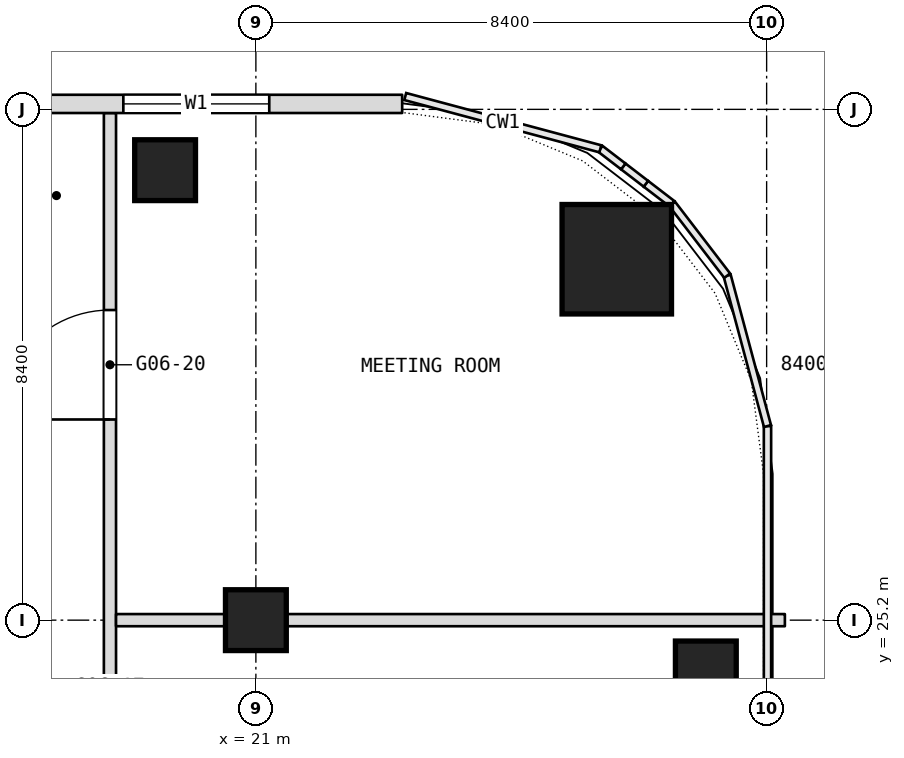
"""IFC4 building model, lengths in metres.
Left out: names, types, materials, properties, quantities, classifications, styles, units other than length and angle.
Written with IfcOpenShell. Run it as: python <this file> out.ifc"""

import sys

from ifc_helpers import new_model, si_unit, direction, frame, frame_2d, origin, origin_2d, place, context, subcontext, project, spatial, rectangle, extrude, element, fill, save


model = new_model("IFC4")
c1 = context("Model", 3, precision=1e-05, world=origin(), true_north=direction((0.0, 1.0)))
c2 = subcontext(c1, "Body", "Model", "MODEL_VIEW")
j1 = project(units=[si_unit("LENGTHUNIT", "METRE"), si_unit("PLANEANGLEUNIT", "RADIAN")], contexts=[c1])
p1 = place(None, origin())
s1 = spatial("IfcSite", under=j1, at=p1, CompositionType="ELEMENT")
p2 = place(p1, origin())
s2 = spatial("IfcBuilding", under=s1, at=p2, CompositionType="ELEMENT")
p3 = place(p2, frame((0.0, 0.0, 76.1)))
s3 = spatial("IfcBuildingStorey", under=s2, at=p3, CompositionType="ELEMENT", Elevation=76.1)
p4 = place(p3, frame((26.936, 31.135, 0.0), z_axis=(0.0, 0.0, 1.0), x_axis=(1.0, 0.0, 0.0)))
e1 = element("IfcColumn", 1, at=p4, inside=s3, PredefinedType="COLUMN", context=c2, shape_type="SweptSolid", body=[
    extrude(rectangle(XDim=1.8, YDim=1.8, at=origin_2d()), origin(), (0.0, 0.0, 1.0), 3.6),
])
for number, where, z_axis, x_axis in (
    (2, (21.0, 25.2, 0.0), (0.0, 0.0, 1.0), (1.0, 0.0, 0.0)),
    (3, (19.507, 32.6, 0.0), (0.0, 0.0, 1.0), (1.0, 0.0, 0.0)),
    (4, (28.4, 24.356, 0.0), (0.0, 0.0, 1.0), (1.0, 0.0, 0.0)),
):
    element("IfcColumn", number, at=place(p3, frame(where, z_axis=z_axis, x_axis=x_axis)), inside=s3, PredefinedType="COLUMN", context=c2, shape_type="SweptSolid", body=[
        extrude(rectangle(XDim=1.0, YDim=1.0, at=origin_2d()), origin(), (0.0, 0.0, 1.0), 3.6),
    ])
p5 = place(p3, frame((18.6, -16.665, 0.0), z_axis=(0.0, 0.0, 1.0), x_axis=(0.0, 1.0, 0.0)))
e5 = element("IfcWall", 5, at=p5, inside=s3, PredefinedType="PARTITIONING", context=c2, shape_type="SweptSolid", body=[
    extrude(rectangle(XDim=50.205, YDim=0.2, at=frame_2d((25.103, 0.0))), origin(), (0.0, 0.0, 1.0), 3.34),
])
p6 = place(p5, frame((4.0, 0.0, 0.0)))
e6 = element("IfcOpeningElement", 6, at=p6, cuts=e5, PredefinedType="OPENING", context=c2, shape_type="SweptSolid", body=[
    extrude(rectangle(XDim=1.1, YDim=2.1, at=frame_2d((0.55, 1.05))), frame((0.0, 0.1, 0.0), z_axis=(0.0, -1.0, 0.0), x_axis=(1.0, 0.0, 0.0)), (0.0, 0.0, 1.0), 0.2),
])
p7 = place(p5, frame((8.665, 0.0, 0.0)))
e7 = element("IfcOpeningElement", 7, at=p7, cuts=e5, PredefinedType="OPENING", context=c2, shape_type="SweptSolid", body=[
    extrude(rectangle(XDim=1.0, YDim=2.1, at=frame_2d((0.5, 1.05))), frame((0.0, 0.1, 0.0), z_axis=(0.0, -1.0, 0.0), x_axis=(1.0, 0.0, 0.0)), (0.0, 0.0, 1.0), 0.2),
])
p8 = place(p5, frame((15.265, 0.0, 0.0)))
e8 = element("IfcOpeningElement", 8, at=p8, cuts=e5, PredefinedType="OPENING", context=c2, shape_type="SweptSolid", body=[
    extrude(rectangle(XDim=1.0, YDim=2.1, at=frame_2d((0.5, 1.05))), frame((0.0, 0.1, 0.0), z_axis=(0.0, -1.0, 0.0), x_axis=(1.0, 0.0, 0.0)), (0.0, 0.0, 1.0), 0.2),
])
p9 = place(p5, frame((19.965, 0.0, 0.0)))
e9 = element("IfcOpeningElement", 9, at=p9, cuts=e5, PredefinedType="OPENING", context=c2, shape_type="SweptSolid", body=[
    extrude(rectangle(XDim=1.8, YDim=2.1, at=frame_2d((0.9, 1.05))), frame((0.0, 0.1, 0.0), z_axis=(0.0, -1.0, 0.0), x_axis=(1.0, 0.0, 0.0)), (0.0, 0.0, 1.0), 0.2),
])
p10 = place(p5, frame((28.665, 0.0, 0.0)))
e10 = element("IfcOpeningElement", 10, at=p10, cuts=e5, PredefinedType="OPENING", context=c2, shape_type="SweptSolid", body=[
    extrude(rectangle(XDim=1.1, YDim=2.1, at=frame_2d((0.55, 1.05))), frame((0.0, 0.1, 0.0), z_axis=(0.0, -1.0, 0.0), x_axis=(1.0, 0.0, 0.0)), (0.0, 0.0, 1.0), 0.2),
])
p11 = place(p5, frame((39.215, 0.0, 0.0)))
e11 = element("IfcOpeningElement", 11, at=p11, cuts=e5, PredefinedType="OPENING", context=c2, shape_type="SweptSolid", body=[
    extrude(rectangle(XDim=1.1, YDim=2.1, at=frame_2d((0.55, 1.05))), frame((0.0, 0.1, 0.0), z_axis=(0.0, -1.0, 0.0), x_axis=(1.0, 0.0, 0.0)), (0.0, 0.0, 1.0), 0.2),
])
p12 = place(p5, frame((45.165, 0.0, 0.0)))
e12 = element("IfcOpeningElement", 12, at=p12, cuts=e5, PredefinedType="OPENING", context=c2, shape_type="SweptSolid", body=[
    extrude(rectangle(XDim=1.8, YDim=2.1, at=frame_2d((0.9, 1.05))), frame((0.0, 0.1, 0.0), z_axis=(0.0, -1.0, 0.0), x_axis=(1.0, 0.0, 0.0)), (0.0, 0.0, 1.0), 0.2),
])
p13 = place(p3, frame((18.7, 25.2, 0.0), z_axis=(0.0, 0.0, 1.0), x_axis=(1.0, 0.0, 0.0)))
e13 = element("IfcWall", 13, at=p13, inside=s3, PredefinedType="PARTITIONING", context=c2, shape_type="SweptSolid", body=[
    extrude(rectangle(XDim=11.0, YDim=0.2, at=frame_2d((5.5, 0.0))), origin(), (0.0, 0.0, 1.0), 2.84),
])
p14 = place(p3, frame((23.406, 33.69, 0.0), z_axis=(0.0, 0.0, 1.0), x_axis=(-1.0, 0.0, 0.0)))
e14 = element("IfcWall", 14, at=p14, inside=s3, PredefinedType="NOTDEFINED", context=c2, shape_type="SweptSolid", body=[
    extrude(rectangle(XDim=46.812, YDim=0.3, at=frame_2d((23.406, 0.0))), origin(), (0.0, 0.0, 1.0), 3.6),
])
p15 = place(p14, frame((2.186, 0.0, 0.9)))
e15 = element("IfcOpeningElement", 15, at=p15, cuts=e14, PredefinedType="OPENING", context=c2, shape_type="SweptSolid", body=[
    extrude(rectangle(XDim=2.4, YDim=2.1, at=frame_2d((1.2, 1.05))), frame((0.0, 0.15, 0.0), z_axis=(0.0, -1.0, 0.0), x_axis=(1.0, 0.0, 0.0)), (0.0, 0.0, 1.0), 0.3),
])
p16 = place(p14, frame((7.506, 0.0, 0.9)))
e16 = element("IfcOpeningElement", 16, at=p16, cuts=e14, PredefinedType="OPENING", context=c2, shape_type="SweptSolid", body=[
    extrude(rectangle(XDim=2.4, YDim=2.1, at=frame_2d((1.2, 1.05))), frame((0.0, 0.15, 0.0), z_axis=(0.0, -1.0, 0.0), x_axis=(1.0, 0.0, 0.0)), (0.0, 0.0, 1.0), 0.3),
])
p17 = place(p14, frame((11.706, 0.0, 0.9)))
e17 = element("IfcOpeningElement", 17, at=p17, cuts=e14, PredefinedType="OPENING", context=c2, shape_type="SweptSolid", body=[
    extrude(rectangle(XDim=2.4, YDim=2.1, at=frame_2d((1.2, 1.05))), frame((0.0, 0.15, 0.0), z_axis=(0.0, -1.0, 0.0), x_axis=(1.0, 0.0, 0.0)), (0.0, 0.0, 1.0), 0.3),
])
p18 = place(p14, frame((15.906, 0.0, 0.9)))
e18 = element("IfcOpeningElement", 18, at=p18, cuts=e14, PredefinedType="OPENING", context=c2, shape_type="SweptSolid", body=[
    extrude(rectangle(XDim=2.4, YDim=2.1, at=frame_2d((1.2, 1.05))), frame((0.0, 0.15, 0.0), z_axis=(0.0, -1.0, 0.0), x_axis=(1.0, 0.0, 0.0)), (0.0, 0.0, 1.0), 0.3),
])
p19 = place(p14, frame((20.106, 0.0, 0.9)))
e19 = element("IfcOpeningElement", 19, at=p19, cuts=e14, PredefinedType="OPENING", context=c2, shape_type="SweptSolid", body=[
    extrude(rectangle(XDim=2.4, YDim=2.1, at=frame_2d((1.2, 1.05))), frame((0.0, 0.15, 0.0), z_axis=(0.0, -1.0, 0.0), x_axis=(1.0, 0.0, 0.0)), (0.0, 0.0, 1.0), 0.3),
])
p20 = place(p14, frame((24.306, 0.0, 0.9)))
e20 = element("IfcOpeningElement", 20, at=p20, cuts=e14, PredefinedType="OPENING", context=c2, shape_type="SweptSolid", body=[
    extrude(rectangle(XDim=2.4, YDim=2.1, at=frame_2d((1.2, 1.05))), frame((0.0, 0.15, 0.0), z_axis=(0.0, -1.0, 0.0), x_axis=(1.0, 0.0, 0.0)), (0.0, 0.0, 1.0), 0.3),
])
p21 = place(p14, frame((28.506, 0.0, 0.9)))
e21 = element("IfcOpeningElement", 21, at=p21, cuts=e14, PredefinedType="OPENING", context=c2, shape_type="SweptSolid", body=[
    extrude(rectangle(XDim=2.4, YDim=2.1, at=frame_2d((1.2, 1.05))), frame((0.0, 0.15, 0.0), z_axis=(0.0, -1.0, 0.0), x_axis=(1.0, 0.0, 0.0)), (0.0, 0.0, 1.0), 0.3),
])
p22 = place(p14, frame((32.706, 0.0, 0.9)))
e22 = element("IfcOpeningElement", 22, at=p22, cuts=e14, PredefinedType="OPENING", context=c2, shape_type="SweptSolid", body=[
    extrude(rectangle(XDim=2.4, YDim=2.1, at=frame_2d((1.2, 1.05))), frame((0.0, 0.15, 0.0), z_axis=(0.0, -1.0, 0.0), x_axis=(1.0, 0.0, 0.0)), (0.0, 0.0, 1.0), 0.3),
])
p23 = place(p14, frame((36.906, 0.0, 0.9)))
e23 = element("IfcOpeningElement", 23, at=p23, cuts=e14, PredefinedType="OPENING", context=c2, shape_type="SweptSolid", body=[
    extrude(rectangle(XDim=2.4, YDim=2.1, at=frame_2d((1.2, 1.05))), frame((0.0, 0.15, 0.0), z_axis=(0.0, -1.0, 0.0), x_axis=(1.0, 0.0, 0.0)), (0.0, 0.0, 1.0), 0.3),
])
p24 = place(p14, frame((42.226, 0.0, 0.9)))
e24 = element("IfcOpeningElement", 24, at=p24, cuts=e14, PredefinedType="OPENING", context=c2, shape_type="SweptSolid", body=[
    extrude(rectangle(XDim=2.4, YDim=2.1, at=frame_2d((1.2, 1.05))), frame((0.0, 0.15, 0.0), z_axis=(0.0, -1.0, 0.0), x_axis=(1.0, 0.0, 0.0)), (0.0, 0.0, 1.0), 0.3),
])
p25 = place(p12, origin())
e25 = element("IfcDoor", 25, at=p25, inside=s3, OperationType="DOUBLE_DOOR_SINGLE_SWING", PredefinedType="DOOR", context=c2, shape_type="SweptSolid", body=[
    extrude(rectangle(XDim=1.8, YDim=2.1, at=frame_2d((0.9, 1.05))), frame((0.0, 0.025, 0.0), z_axis=(0.0, -1.0, 0.0), x_axis=(1.0, 0.0, 0.0)), (0.0, 0.0, 1.0), 0.05),
])
fill(e12, e25)
p26 = place(p15, origin())
e26 = element("IfcWindow", 26, at=p26, inside=s3, PartitioningType="SINGLE_PANEL", PredefinedType="WINDOW", context=c2, shape_type="SweptSolid", body=[
    extrude(rectangle(XDim=2.4, YDim=2.1, at=frame_2d((1.2, 1.05))), frame((0.0, 0.03, 0.0), z_axis=(0.0, -1.0, 0.0), x_axis=(1.0, 0.0, 0.0)), (0.0, 0.0, 1.0), 0.06),
])
fill(e15, e26)
save(model, sys.argv[1])
